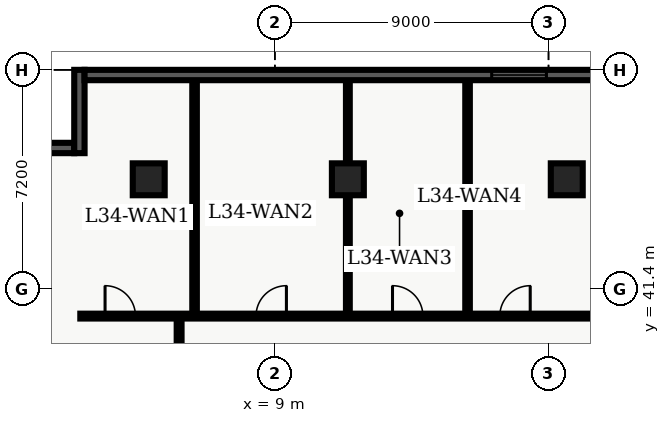
"""IFC4 building model, lengths in metres.
Left out: names, types, materials, properties, quantities, classifications, styles, units other than length and angle.
Written with IfcOpenShell. Run it as: python <this file> out.ifc"""

import sys

from ifc_helpers import new_model, entity, si_unit, converted_unit, direction, frame, origin_with_axes, origin_2d_with_axis, place, context, subcontext, project, spatial, polyline, rectangle, outline, extrude, element, fill, save


model = new_model("IFC4")
c1 = context("Model", 3, precision=1e-05, world=origin_with_axes(), true_north=direction((0.0, 1.0)))
c2 = subcontext(c1, "Body", "Model", "MODEL_VIEW")
j1 = project(units=[si_unit("LENGTHUNIT", "METRE"), converted_unit("PLANEANGLEUNIT", "DEGREE", entity("IfcPlaneAngleMeasure", 0.017), si_unit("PLANEANGLEUNIT", "RADIAN"), dimensions=[0, 0, 0, 0, 0, 0, 0])], contexts=[c1])
p1 = place(None, origin_with_axes())
s1 = spatial("IfcSite", under=j1, at=p1, CompositionType="ELEMENT")
p2 = place(p1, origin_with_axes())
s2 = spatial("IfcBuilding", under=s1, at=p2, CompositionType="ELEMENT")
p3 = place(p2, frame((0.0, 0.0, 140.7), z_axis=(0.0, 0.0, 1.0), x_axis=(1.0, 0.0, 0.0)))
s3 = spatial("IfcBuildingStorey", under=s2, at=p3, CompositionType="ELEMENT", Elevation=140.7)
for number, where, z_axis, x_axis in (
    (1, (11.4, 45.0, 0.0), (0.0, 0.0, 1.0), (1.0, 0.0, 0.0)),
    (2, (18.6, 45.0, 0.0), (0.0, 0.0, 1.0), (1.0, 0.0, 0.0)),
    (3, (4.85, 45.0, 0.0), (0.0, 0.0, 1.0), (1.0, 0.0, 0.0)),
):
    element("IfcColumn", number, at=place(p3, frame(where, z_axis=z_axis, x_axis=x_axis)), inside=s3, PredefinedType="COLUMN", context=c2, shape_type="SweptSolid", body=[
        extrude(rectangle(XDim=1.05, YDim=1.05, at=origin_2d_with_axis()), origin_with_axes(), (0.0, 0.0, 1.0), 3.9),
    ])
p4 = place(p3, frame((2.6, 40.5, 0.0), z_axis=(0.0, 0.0, 1.0), x_axis=(1.0, 0.0, 0.0)))
e4 = element("IfcWall", 4, at=p4, inside=s3, PredefinedType="PARTITIONING", context=c2, shape_type="SweptSolid", body=[
    extrude(outline(polyline([(0.0, -0.08), (19.054, -0.08), (19.054, 0.08), (0.0, 0.08), (0.0, -0.08)])), origin_with_axes(), (0.0, 0.0, 1.0), 2.7),
])
p5 = place(p4, frame((1.314, 0.0, 0.0), z_axis=(0.0, 0.0, 1.0), x_axis=(1.0, 0.0, 0.0)))
e5 = element("IfcOpeningElement", 5, at=p5, cuts=e4, PredefinedType="OPENING", context=c2, shape_type="SweptSolid", body=[
    extrude(rectangle(XDim=1.0, YDim=0.18, at=origin_2d_with_axis()), origin_with_axes(), (0.0, 0.0, 1.0), 2.15),
])
p6 = place(p4, frame((6.279, 0.0, 0.0), z_axis=(0.0, 0.0, 1.0), x_axis=(1.0, 0.0, 0.0)))
e6 = element("IfcOpeningElement", 6, at=p6, cuts=e4, PredefinedType="OPENING", context=c2, shape_type="SweptSolid", body=[
    extrude(rectangle(XDim=1.0, YDim=0.18, at=origin_2d_with_axis()), origin_with_axes(), (0.0, 0.0, 1.0), 2.15),
])
p7 = place(p4, frame((10.768, 0.0, 0.0), z_axis=(0.0, 0.0, 1.0), x_axis=(1.0, 0.0, 0.0)))
e7 = element("IfcOpeningElement", 7, at=p7, cuts=e4, PredefinedType="OPENING", context=c2, shape_type="SweptSolid", body=[
    extrude(rectangle(XDim=1.0, YDim=0.18, at=origin_2d_with_axis()), origin_with_axes(), (0.0, 0.0, 1.0), 2.15),
])
p8 = place(p4, frame((14.298, 0.0, 0.0), z_axis=(0.0, 0.0, 1.0), x_axis=(1.0, 0.0, 0.0)))
e8 = element("IfcOpeningElement", 8, at=p8, cuts=e4, PredefinedType="OPENING", context=c2, shape_type="SweptSolid", body=[
    extrude(rectangle(XDim=1.0, YDim=0.18, at=origin_2d_with_axis()), origin_with_axes(), (0.0, 0.0, 1.0), 2.15),
])
p9 = place(p3, frame((5.85, 7.8, 0.0), z_axis=(0.0, 0.0, 1.0), x_axis=(0.0, 1.0, 0.0)))
e9 = element("IfcWall", 9, at=p9, inside=s3, PredefinedType="PARTITIONING", context=c2, shape_type="SweptSolid", body=[
    extrude(outline(polyline([(0.0, -0.08), (32.7, -0.08), (32.7, 0.08), (0.0, 0.08), (0.0, -0.08)])), origin_with_axes(), (0.0, 0.0, 1.0), 2.7),
])
p10 = place(p9, frame((7.056, 0.0, 0.0), z_axis=(0.0, 0.0, 1.0), x_axis=(1.0, 0.0, 0.0)))
e10 = element("IfcOpeningElement", 10, at=p10, cuts=e9, PredefinedType="OPENING", context=c2, shape_type="SweptSolid", body=[
    extrude(rectangle(XDim=1.0, YDim=0.18, at=origin_2d_with_axis()), origin_with_axes(), (0.0, 0.0, 1.0), 2.15),
])
p11 = place(p9, frame((23.276, 0.0, 0.0), z_axis=(0.0, 0.0, 1.0), x_axis=(1.0, 0.0, 0.0)))
e11 = element("IfcOpeningElement", 11, at=p11, cuts=e9, PredefinedType="OPENING", context=c2, shape_type="SweptSolid", body=[
    extrude(rectangle(XDim=1.0, YDim=0.18, at=origin_2d_with_axis()), origin_with_axes(), (0.0, 0.0, 1.0), 2.15),
])
p12 = place(p3, frame((6.358, 40.6, 0.0), z_axis=(0.0, 0.0, 1.0), x_axis=(0.0, 1.0, 0.0)))
e12 = element("IfcWall", 12, at=p12, inside=s3, PredefinedType="PARTITIONING", context=c2, shape_type="SweptSolid", body=[
    extrude(outline(polyline([(0.0, -0.075), (7.665, -0.075), (7.665, 0.075), (0.0, 0.075), (0.0, -0.075)])), origin_with_axes(), (0.0, 0.0, 1.0), 2.7),
])
p13 = place(p3, frame((11.4, 40.6, 0.0), z_axis=(0.0, 0.0, 1.0), x_axis=(0.0, 1.0, 0.0)))
e13 = element("IfcWall", 13, at=p13, inside=s3, PredefinedType="PARTITIONING", context=c2, shape_type="SweptSolid", body=[
    extrude(outline(polyline([(0.0, -0.062), (7.665, -0.062), (7.665, 0.062), (0.0, 0.062), (0.0, -0.062)])), origin_with_axes(), (0.0, 0.0, 1.0), 2.7),
])
p14 = place(p3, frame((15.337, 40.6, 0.0), z_axis=(0.0, 0.0, 1.0), x_axis=(0.0, 1.0, 0.0)))
e14 = element("IfcWall", 14, at=p14, inside=s3, PredefinedType="PARTITIONING", context=c2, shape_type="SweptSolid", body=[
    extrude(outline(polyline([(0.0, -0.075), (7.665, -0.075), (7.665, 0.075), (0.0, 0.075), (0.0, -0.075)])), origin_with_axes(), (0.0, 0.0, 1.0), 2.7),
])
p15 = place(p3, frame((0.34, 46.03, 0.0), z_axis=(0.0, 0.0, 1.0), x_axis=(1.0, 0.0, 0.0)))
e15 = element("IfcWall", 15, at=p15, inside=s3, PredefinedType="SOLIDWALL", context=c2, shape_type="SweptSolid", body=[
    extrude(outline(polyline([(0.0, -0.17), (2.06, -0.17), (2.06, 0.17), (0.0, 0.17), (0.0, -0.17)])), origin_with_axes(), (0.0, 0.0, 1.0), 3.66),
])
p16 = place(p3, frame((2.57, 45.86, 0.0), z_axis=(0.0, 0.0, 1.0), x_axis=(0.0, 1.0, 0.0)))
e16 = element("IfcWall", 16, at=p16, inside=s3, PredefinedType="SOLIDWALL", context=c2, shape_type="SweptSolid", body=[
    extrude(outline(polyline([(0.0, -0.17), (2.74, -0.17), (2.74, 0.17), (0.0, 0.17), (0.0, -0.17)])), origin_with_axes(), (0.0, 0.0, 1.0), 3.66),
])
p17 = place(p3, frame((2.74, 48.43, 0.0), z_axis=(0.0, 0.0, 1.0), x_axis=(1.0, 0.0, 0.0)))
e17 = element("IfcWall", 17, at=p17, inside=s3, PredefinedType="SOLIDWALL", context=c2, shape_type="SweptSolid", body=[
    extrude(outline(polyline([(0.0, -0.17), (17.089, -0.17), (17.089, 0.17), (0.0, 0.17), (0.0, -0.17)])), origin_with_axes(), (0.0, 0.0, 1.0), 3.66),
])
p18 = place(p17, frame((14.291, 0.0, 0.45), z_axis=(0.0, 0.0, 1.0), x_axis=(1.0, 0.0, 0.0)))
e18 = element("IfcOpeningElement", 18, at=p18, cuts=e17, PredefinedType="OPENING", context=c2, shape_type="SweptSolid", body=[
    extrude(rectangle(XDim=1.8, YDim=0.36, at=origin_2d_with_axis()), origin_with_axes(), (0.0, 0.0, 1.0), 2.1),
])
p19 = place(p4, frame((1.314, 0.0, 0.0), z_axis=(0.0, 0.0, 1.0), x_axis=(1.0, 0.0, 0.0)))
e19 = element("IfcDoor", 19, at=p19, inside=s3, OperationType="SINGLE_SWING_LEFT", PredefinedType="DOOR", context=c2, shape_type="SweptSolid", body=[
    extrude(rectangle(XDim=1.0, YDim=0.09, at=origin_2d_with_axis()), origin_with_axes(), (0.0, 0.0, 1.0), 2.15),
])
fill(e5, e19)
p20 = place(p4, frame((6.279, 0.0, 0.0), z_axis=(0.0, 0.0, 1.0), x_axis=(1.0, 0.0, 0.0)))
e20 = element("IfcDoor", 20, at=p20, inside=s3, OperationType="SINGLE_SWING_RIGHT", PredefinedType="DOOR", context=c2, shape_type="SweptSolid", body=[
    extrude(rectangle(XDim=1.0, YDim=0.09, at=origin_2d_with_axis()), origin_with_axes(), (0.0, 0.0, 1.0), 2.15),
])
fill(e6, e20)
p21 = place(p4, frame((10.768, 0.0, 0.0), z_axis=(0.0, 0.0, 1.0), x_axis=(1.0, 0.0, 0.0)))
e21 = element("IfcDoor", 21, at=p21, inside=s3, OperationType="SINGLE_SWING_LEFT", PredefinedType="DOOR", context=c2, shape_type="SweptSolid", body=[
    extrude(rectangle(XDim=1.0, YDim=0.09, at=origin_2d_with_axis()), origin_with_axes(), (0.0, 0.0, 1.0), 2.15),
])
fill(e7, e21)
p22 = place(p4, frame((14.298, 0.0, 0.0), z_axis=(0.0, 0.0, 1.0), x_axis=(1.0, 0.0, 0.0)))
e22 = element("IfcDoor", 22, at=p22, inside=s3, OperationType="SINGLE_SWING_RIGHT", PredefinedType="DOOR", context=c2, shape_type="SweptSolid", body=[
    extrude(rectangle(XDim=1.0, YDim=0.09, at=origin_2d_with_axis()), origin_with_axes(), (0.0, 0.0, 1.0), 2.15),
])
fill(e8, e22)
p23 = place(p17, frame((14.291, 0.0, 0.45), z_axis=(0.0, 0.0, 1.0), x_axis=(1.0, 0.0, 0.0)))
e23 = element("IfcWindow", 23, at=p23, inside=s3, PredefinedType="WINDOW", context=c2, shape_type="SweptSolid", body=[
    extrude(rectangle(XDim=1.8, YDim=0.09, at=origin_2d_with_axis()), origin_with_axes(), (0.0, 0.0, 1.0), 2.1),
])
fill(e18, e23)
save(model, sys.argv[1])
